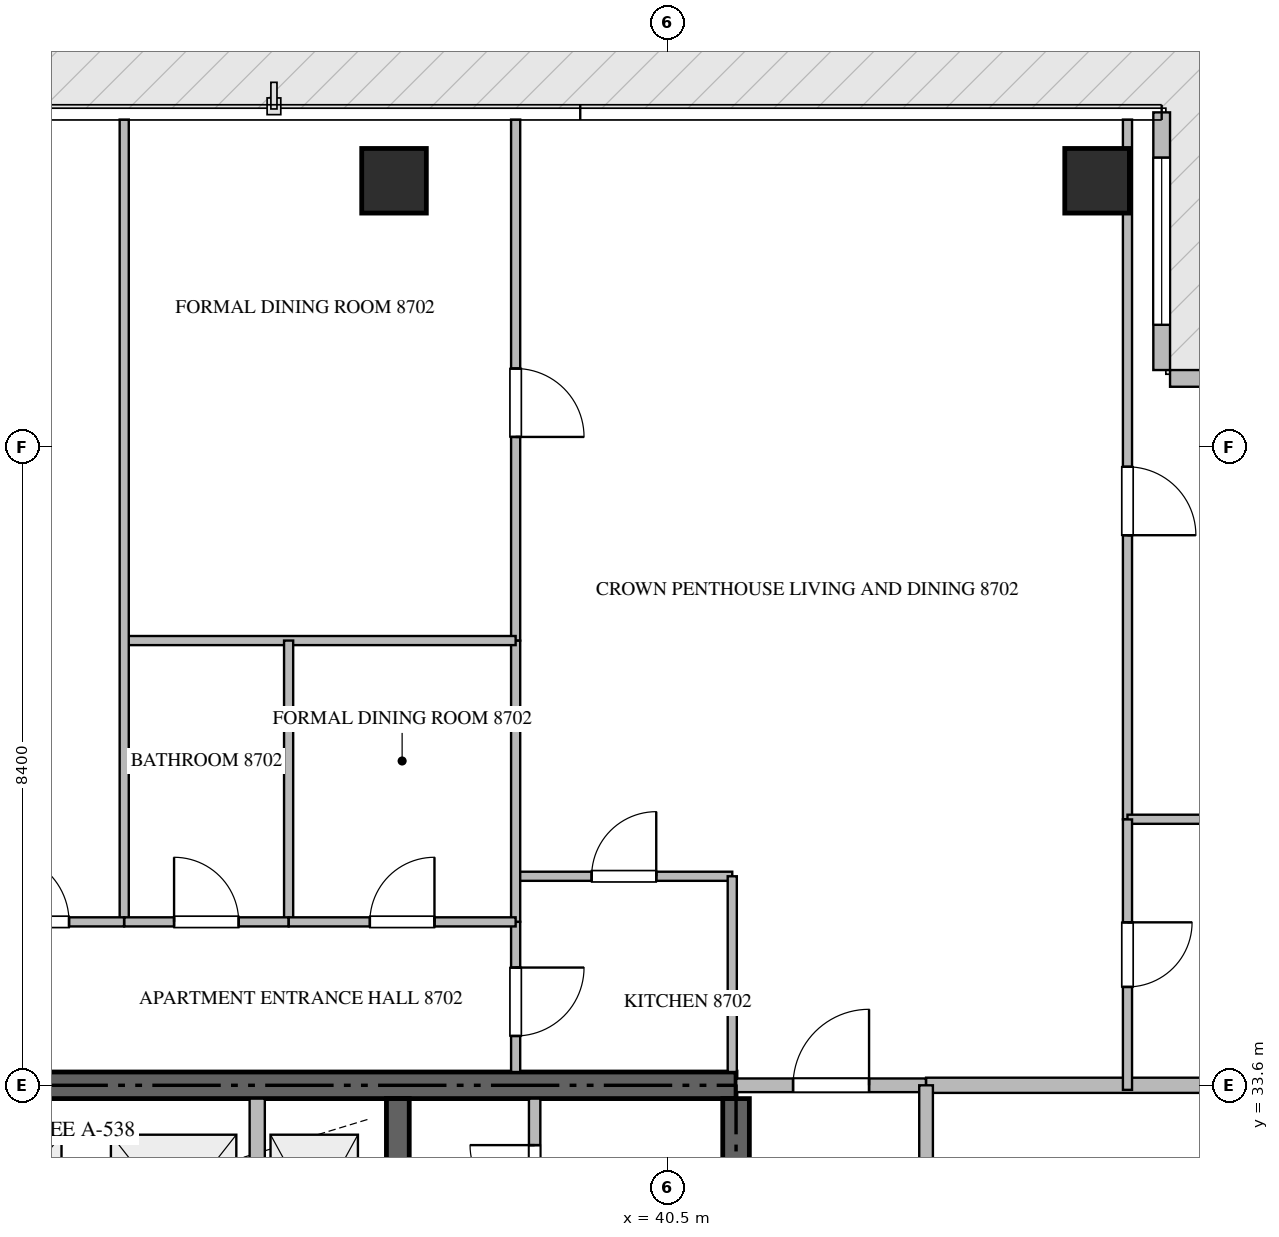
"""IFC4 building model, lengths in metres.
Left out: names, types, materials, properties, quantities, classifications, styles, units other than length and angle.
Written with IfcOpenShell. Run it as: python <this file> out.ifc"""

import sys

from ifc_helpers import new_model, si_unit, direction, frame, frame_2d, origin, origin_2d, place, context, subcontext, project, spatial, rectangle, extrude, source, transform, mapped, element, fill, save


model = new_model("IFC4")
c1 = context("Model", 3, precision=1e-05, world=origin(), true_north=direction((0.0, 1.0)))
c2 = subcontext(c1, "Body", "Model", "MODEL_VIEW")
j1 = project(units=[si_unit("LENGTHUNIT", "METRE"), si_unit("PLANEANGLEUNIT", "RADIAN")], contexts=[c1])
p1 = place(None, origin())
s1 = spatial("IfcSite", under=j1, at=p1, CompositionType="ELEMENT")
p2 = place(p1, origin())
s2 = spatial("IfcBuilding", under=s1, at=p2, CompositionType="ELEMENT")
p3 = place(p2, frame((0.0, 0.0, 353.85)))
s3 = spatial("IfcBuildingStorey", under=s2, at=p3, CompositionType="ELEMENT", Elevation=353.85)
p4 = place(p3, frame((41.4, 33.6, -0.26), z_axis=(0.0, 0.0, 1.0), x_axis=(-1.0, 0.0, 0.0)))
e1 = element("IfcWall", 1, at=p4, inside=s3, PredefinedType="SHEAR", context=c2, shape_type="SweptSolid", body=[
    extrude(rectangle(XDim=18.0, YDim=0.35, at=frame_2d((9.0, 0.0))), origin(), (0.0, 0.0, 1.0), 5.798),
])
p5 = place(p3, frame((41.4, 27.75, -0.26), z_axis=(0.0, 0.0, 1.0), x_axis=(0.0, 1.0, 0.0)))
e2 = element("IfcWall", 2, at=p5, inside=s3, PredefinedType="SHEAR", context=c2, shape_type="SweptSolid", body=[
    extrude(rectangle(XDim=5.675, YDim=0.35, at=frame_2d((2.837, 0.0))), origin(), (0.0, 0.0, 1.0), 5.798),
])
p6 = place(p3, frame((36.95, 27.05, -0.26), z_axis=(0.0, 0.0, 1.0), x_axis=(0.0, 1.0, 0.0)))
e3 = element("IfcWall", 3, at=p6, inside=s3, PredefinedType="SHEAR", context=c2, shape_type="SweptSolid", body=[
    extrude(rectangle(XDim=6.375, YDim=0.3, at=frame_2d((3.188, 0.0))), origin(), (0.0, 0.0, 1.0), 5.798),
])
m1 = source(origin(), c2, "Body", "SweptSolid", [
    extrude(rectangle(XDim=0.85, YDim=0.85, at=origin_2d()), origin(), (0.0, 0.0, 1.0), 5.8),
])
for number, where, z_axis, x_axis in (
    (4, (36.9, 45.5, -0.26), (0.0, 0.0, 1.0), (1.0, 0.0, 0.0)),
    (5, (46.15, 45.5, -0.26), (0.0, 0.0, 1.0), (1.0, 0.0, 0.0)),
):
    element("IfcColumn", number, at=place(p3, frame(where, z_axis=z_axis, x_axis=x_axis)), inside=s3, PredefinedType="COLUMN", context=c2, shape_type="MappedRepresentation", body=[
        mapped(m1, transform((0.0, 0.0, 0.0), scale=1.0)),
    ])
p7 = place(p3, frame((50.39, 42.9, 0.0), z_axis=(0.0, 0.0, 1.0), x_axis=(-1.0, 0.0, 0.0)))
e6 = element("IfcWall", 6, at=p7, inside=s3, PredefinedType="ELEMENTEDWALL", context=c2, shape_type="SweptSolid", body=[
    extrude(rectangle(XDim=3.28, YDim=0.22, at=frame_2d((1.64, 0.0))), origin(), (0.0, 0.0, 1.0), 5.525),
])
p8 = place(p7, frame((0.54, 0.0, 0.65)))
e7 = element("IfcOpeningElement", 7, at=p8, cuts=e6, PredefinedType="OPENING", context=c2, shape_type="SweptSolid", body=[
    extrude(rectangle(XDim=2.2, YDim=2.4, at=frame_2d((1.1, 1.2))), frame((0.0, 0.12, 0.0), z_axis=(0.0, -1.0, 0.0), x_axis=(1.0, 0.0, 0.0)), (0.0, 0.0, 1.0), 0.24),
])
p9 = place(p3, frame((47.0, 43.01, 0.0), z_axis=(0.0, 0.0, 1.0), x_axis=(0.0, 1.0, 0.0)))
e8 = element("IfcWall", 8, at=p9, inside=s3, PredefinedType="ELEMENTEDWALL", context=c2, shape_type="SweptSolid", body=[
    extrude(rectangle(XDim=3.39, YDim=0.22, at=frame_2d((1.695, 0.0))), origin(), (0.0, 0.0, 1.0), 5.525),
])
p10 = place(p9, frame((0.595, 0.0, 0.65)))
e9 = element("IfcOpeningElement", 9, at=p10, cuts=e8, PredefinedType="OPENING", context=c2, shape_type="SweptSolid", body=[
    extrude(rectangle(XDim=2.2, YDim=2.4, at=frame_2d((1.1, 1.2))), frame((0.0, 0.12, 0.0), z_axis=(0.0, -1.0, 0.0), x_axis=(1.0, 0.0, 0.0)), (0.0, 0.0, 1.0), 0.24),
])
p11 = place(p3, frame((35.1, 30.75, 0.0), z_axis=(0.0, 0.0, 1.0), x_axis=(0.0, 1.0, 0.0)))
e10 = element("IfcWall", 10, at=p11, inside=s3, PredefinedType="STANDARD", context=c2, shape_type="SweptSolid", body=[
    extrude(rectangle(XDim=2.675, YDim=0.2, at=frame_2d((1.337, 0.0))), origin(), (0.0, 0.0, 1.0), 5.54),
])
p12 = place(p3, frame((38.75, 31.352, 0.0), z_axis=(0.0, 0.0, 1.0), x_axis=(0.0, 1.0, 0.0)))
e11 = element("IfcWall", 11, at=p12, inside=s3, PredefinedType="PARTITIONING", context=c2, shape_type="SweptSolid", body=[
    extrude(rectangle(XDim=2.073, YDim=0.15, at=frame_2d((1.037, 0.0))), origin(), (0.0, 0.0, 1.0), 5.54),
])
p13 = place(p12, frame((0.611, 0.0, 0.0)))
e12 = element("IfcOpeningElement", 12, at=p13, cuts=e11, PredefinedType="OPENING", context=c2, shape_type="SweptSolid", body=[
    extrude(rectangle(XDim=0.85, YDim=2.1, at=frame_2d((0.425, 1.05))), frame((0.0, 0.085, 0.0), z_axis=(0.0, -1.0, 0.0), x_axis=(1.0, 0.0, 0.0)), (0.0, 0.0, 1.0), 0.17),
])
p14 = place(p3, frame((43.9, 33.6, 0.0), z_axis=(0.0, 0.0, 1.0), x_axis=(1.0, 0.0, 0.0)))
e13 = element("IfcWall", 13, at=p14, inside=s3, PredefinedType="PARTITIONING", context=c2, shape_type="SweptSolid", body=[
    extrude(rectangle(XDim=10.018, YDim=0.2, at=frame_2d((5.009, 0.0))), origin(), (0.0, 0.0, 1.0), 5.54),
])
p15 = place(p3, frame((41.402, 33.6, 0.0), z_axis=(0.0, 0.0, 1.0), x_axis=(1.0, 0.0, 0.0)))
e14 = element("IfcWall", 14, at=p15, inside=s3, PredefinedType="PARTITIONING", context=c2, shape_type="SweptSolid", body=[
    extrude(rectangle(XDim=2.496, YDim=0.18, at=frame_2d((1.248, 0.0))), origin(), (0.0, 0.0, 1.0), 5.54),
])
p16 = place(p15, frame((0.748, 0.0, 0.0)))
e15 = element("IfcOpeningElement", 15, at=p16, cuts=e14, PredefinedType="OPENING", context=c2, shape_type="SweptSolid", body=[
    extrude(rectangle(XDim=1.0, YDim=2.15, at=frame_2d((0.5, 1.075))), frame((0.0, 0.1, 0.0), z_axis=(0.0, -1.0, 0.0), x_axis=(1.0, 0.0, 0.0)), (0.0, 0.0, 1.0), 0.2),
])
p17 = place(p3, frame((43.9, 16.8, 0.0), z_axis=(0.0, 0.0, 1.0), x_axis=(0.0, 1.0, 0.0)))
e16 = element("IfcWall", 16, at=p17, inside=s3, PredefinedType="PARTITIONING", context=c2, shape_type="SweptSolid", body=[
    extrude(rectangle(XDim=16.8, YDim=0.18, at=frame_2d((8.4, 0.0))), origin(), (0.0, 0.0, 1.0), 5.54),
])
p18 = place(p17, frame((14.5, 0.0, 0.0)))
e17 = element("IfcOpeningElement", 17, at=p18, cuts=e16, PredefinedType="OPENING", context=c2, shape_type="SweptSolid", body=[
    extrude(rectangle(XDim=1.0, YDim=2.15, at=frame_2d((0.5, 1.075))), frame((0.0, 0.1, 0.0), z_axis=(0.0, -1.0, 0.0), x_axis=(1.0, 0.0, 0.0)), (0.0, 0.0, 1.0), 0.2),
])
p19 = place(p3, frame((38.5, 36.35, 0.0), z_axis=(0.0, 0.0, 1.0), x_axis=(1.0, 0.0, 0.0)))
e18 = element("IfcWall", 18, at=p19, inside=s3, PredefinedType="PARTITIONING", context=c2, shape_type="SweptSolid", body=[
    extrude(rectangle(XDim=2.85, YDim=0.12, at=frame_2d((1.425, 0.0))), origin(), (0.0, 0.0, 1.0), 5.54),
])
p20 = place(p19, frame((1.0, 0.0, 0.0)))
e19 = element("IfcOpeningElement", 19, at=p20, cuts=e18, PredefinedType="OPENING", context=c2, shape_type="SweptSolid", body=[
    extrude(rectangle(XDim=0.85, YDim=2.1, at=frame_2d((0.425, 1.05))), frame((0.0, 0.07, 0.0), z_axis=(0.0, -1.0, 0.0), x_axis=(1.0, 0.0, 0.0)), (0.0, 0.0, 1.0), 0.14),
])
p21 = place(p3, frame((41.35, 36.35, 0.0), z_axis=(0.0, 0.0, 1.0), x_axis=(0.0, -1.0, 0.0)))
e20 = element("IfcWall", 20, at=p21, inside=s3, PredefinedType="PARTITIONING", context=c2, shape_type="SweptSolid", body=[
    extrude(rectangle(XDim=2.575, YDim=0.12, at=frame_2d((1.288, 0.0))), origin(), (0.0, 0.0, 1.0), 5.54),
])
p22 = place(p3, frame((38.5, 35.75, 0.0), z_axis=(0.0, 0.0, 1.0), x_axis=(0.0, -1.0, 0.0)))
e21 = element("IfcWall", 21, at=p22, inside=s3, PredefinedType="PARTITIONING", context=c2, shape_type="SweptSolid", body=[
    extrude(rectangle(XDim=1.975, YDim=0.12, at=frame_2d((0.988, 0.0))), origin(), (0.0, 0.0, 1.0), 5.54),
])
p23 = place(p22, frame((0.601, 0.0, 0.0)))
e22 = element("IfcOpeningElement", 22, at=p23, cuts=e21, PredefinedType="OPENING", context=c2, shape_type="SweptSolid", body=[
    extrude(rectangle(XDim=0.9, YDim=2.1, at=frame_2d((0.45, 1.05))), frame((0.0, 0.07, 0.0), z_axis=(0.0, -1.0, 0.0), x_axis=(1.0, 0.0, 0.0)), (0.0, 0.0, 1.0), 0.14),
])
p24 = place(p3, frame((38.5, 46.305, 0.0), z_axis=(0.0, 0.0, 1.0), x_axis=(0.0, -1.0, 0.0)))
e23 = element("IfcWall", 23, at=p24, inside=s3, PredefinedType="PARTITIONING", context=c2, shape_type="SweptSolid", body=[
    extrude(rectangle(XDim=6.854, YDim=0.12, at=frame_2d((3.427, 0.0))), origin(), (0.0, 0.0, 1.0), 5.54),
])
p25 = place(p24, frame((3.275, 0.0, 0.0)))
e24 = element("IfcOpeningElement", 24, at=p25, cuts=e23, PredefinedType="OPENING", context=c2, shape_type="SweptSolid", body=[
    extrude(rectangle(XDim=0.9, YDim=2.1, at=frame_2d((0.45, 1.05))), frame((0.0, 0.07, 0.0), z_axis=(0.0, -1.0, 0.0), x_axis=(1.0, 0.0, 0.0)), (0.0, 0.0, 1.0), 0.14),
])
p26 = place(p3, frame((38.5, 39.449, 0.0), z_axis=(0.0, 0.0, 1.0), x_axis=(0.0, -1.0, 0.0)))
e25 = element("IfcWall", 25, at=p26, inside=s3, PredefinedType="PARTITIONING", context=c2, shape_type="SweptSolid", body=[
    extrude(rectangle(XDim=3.697, YDim=0.12, at=frame_2d((1.849, 0.0))), origin(), (0.0, 0.0, 1.0), 5.54),
])
p27 = place(p3, frame((33.35, 39.451, 0.0), z_axis=(0.0, 0.0, 1.0), x_axis=(1.0, 0.0, 0.0)))
e26 = element("IfcWall", 26, at=p27, inside=s3, PredefinedType="PARTITIONING", context=c2, shape_type="SweptSolid", body=[
    extrude(rectangle(XDim=5.15, YDim=0.12, at=frame_2d((2.575, 0.0))), origin(), (0.0, 0.0, 1.0), 5.54),
])
p28 = place(p3, frame((33.35, 46.305, 0.0), z_axis=(0.0, 0.0, 1.0), x_axis=(0.0, -1.0, 0.0)))
e27 = element("IfcWall", 27, at=p28, inside=s3, PredefinedType="PARTITIONING", context=c2, shape_type="SweptSolid", body=[
    extrude(rectangle(XDim=10.555, YDim=0.12, at=frame_2d((5.277, 0.0))), origin(), (0.0, 0.0, 1.0), 5.54),
])
p29 = place(p3, frame((35.513, 39.451, 0.0), z_axis=(0.0, 0.0, 1.0), x_axis=(0.0, -1.0, 0.0)))
e28 = element("IfcWall", 28, at=p29, inside=s3, PredefinedType="PARTITIONING", context=c2, shape_type="SweptSolid", body=[
    extrude(rectangle(XDim=3.701, YDim=0.12, at=frame_2d((1.851, 0.0))), origin(), (0.0, 0.0, 1.0), 5.54),
])
p30 = place(p3, frame((33.35, 35.75, 0.0), z_axis=(0.0, 0.0, 1.0), x_axis=(1.0, 0.0, 0.0)))
e29 = element("IfcWall", 29, at=p30, inside=s3, PredefinedType="PARTITIONING", context=c2, shape_type="SweptSolid", body=[
    extrude(rectangle(XDim=2.163, YDim=0.12, at=frame_2d((1.082, 0.0))), origin(), (0.0, 0.0, 1.0), 5.54),
])
p31 = place(p30, frame((0.656, 0.0, 0.0)))
e30 = element("IfcOpeningElement", 30, at=p31, cuts=e29, PredefinedType="OPENING", context=c2, shape_type="SweptSolid", body=[
    extrude(rectangle(XDim=0.85, YDim=2.1, at=frame_2d((0.425, 1.05))), frame((0.0, 0.07, 0.0), z_axis=(0.0, -1.0, 0.0), x_axis=(1.0, 0.0, 0.0)), (0.0, 0.0, 1.0), 0.14),
])
p32 = place(p3, frame((35.515, 35.75, 0.0), z_axis=(0.0, 0.0, 1.0), x_axis=(1.0, 0.0, 0.0)))
e31 = element("IfcWall", 31, at=p32, inside=s3, PredefinedType="PARTITIONING", context=c2, shape_type="SweptSolid", body=[
    extrude(rectangle(XDim=2.985, YDim=0.12, at=frame_2d((1.493, 0.0))), origin(), (0.0, 0.0, 1.0), 5.54),
])
p33 = place(p32, frame((1.067, 0.0, 0.0)))
e32 = element("IfcOpeningElement", 32, at=p33, cuts=e31, PredefinedType="OPENING", context=c2, shape_type="SweptSolid", body=[
    extrude(rectangle(XDim=0.85, YDim=2.1, at=frame_2d((0.425, 1.05))), frame((0.0, 0.07, 0.0), z_axis=(0.0, -1.0, 0.0), x_axis=(1.0, 0.0, 0.0)), (0.0, 0.0, 1.0), 0.14),
])
p34 = place(p3, frame((31.0, 35.75, 0.0), z_axis=(0.0, 0.0, 1.0), x_axis=(1.0, 0.0, 0.0)))
e33 = element("IfcWall", 33, at=p34, inside=s3, PredefinedType="PARTITIONING", context=c2, shape_type="SweptSolid", body=[
    extrude(rectangle(XDim=2.348, YDim=0.12, at=frame_2d((1.174, 0.0))), origin(), (0.0, 0.0, 1.0), 5.54),
])
p35 = place(p34, frame((0.724, 0.0, 0.0)))
e34 = element("IfcOpeningElement", 34, at=p35, cuts=e33, PredefinedType="OPENING", context=c2, shape_type="SweptSolid", body=[
    extrude(rectangle(XDim=0.9, YDim=2.1, at=frame_2d((0.45, 1.05))), frame((0.0, 0.07, 0.0), z_axis=(0.0, -1.0, 0.0), x_axis=(1.0, 0.0, 0.0)), (0.0, 0.0, 1.0), 0.14),
])
p36 = place(p3, frame((46.55, 46.305, 0.0), z_axis=(0.0, 0.0, 1.0), x_axis=(0.0, -1.0, 0.0)))
e35 = element("IfcWall", 35, at=p36, inside=s3, PredefinedType="PARTITIONING", context=c2, shape_type="SweptSolid", body=[
    extrude(rectangle(XDim=9.205, YDim=0.12, at=frame_2d((4.603, 0.0))), origin(), (0.0, 0.0, 1.0), 5.54),
])
p37 = place(p36, frame((4.568, 0.0, 0.0)))
e36 = element("IfcOpeningElement", 36, at=p37, cuts=e35, PredefinedType="OPENING", context=c2, shape_type="SweptSolid", body=[
    extrude(rectangle(XDim=0.9, YDim=2.1, at=frame_2d((0.45, 1.05))), frame((0.0, 0.07, 0.0), z_axis=(0.0, -1.0, 0.0), x_axis=(1.0, 0.0, 0.0)), (0.0, 0.0, 1.0), 0.14),
])
p38 = place(p3, frame((46.55, 37.1, 0.0), z_axis=(0.0, 0.0, 1.0), x_axis=(1.0, 0.0, 0.0)))
e37 = element("IfcWall", 37, at=p38, inside=s3, PredefinedType="PARTITIONING", context=c2, shape_type="SweptSolid", body=[
    extrude(rectangle(XDim=7.355, YDim=0.12, at=frame_2d((3.677, 0.0))), origin(), (0.0, 0.0, 1.0), 5.54),
])
p39 = place(p3, frame((46.55, 37.098, 0.0), z_axis=(0.0, 0.0, 1.0), x_axis=(0.0, -1.0, 0.0)))
e38 = element("IfcWall", 38, at=p39, inside=s3, PredefinedType="PARTITIONING", context=c2, shape_type="SweptSolid", body=[
    extrude(rectangle(XDim=3.558, YDim=0.12, at=frame_2d((1.779, 0.0))), origin(), (0.0, 0.0, 1.0), 5.54),
])
p40 = place(p39, frame((1.354, 0.0, 0.0)))
e39 = element("IfcOpeningElement", 39, at=p40, cuts=e38, PredefinedType="OPENING", context=c2, shape_type="SweptSolid", body=[
    extrude(rectangle(XDim=0.85, YDim=2.1, at=frame_2d((0.425, 1.05))), frame((0.0, 0.07, 0.0), z_axis=(0.0, -1.0, 0.0), x_axis=(1.0, 0.0, 0.0)), (0.0, 0.0, 1.0), 0.14),
])
m2 = source(origin(), c2, "Body", "SweptSolid", [
    extrude(rectangle(XDim=2.2, YDim=2.4, at=frame_2d((1.1, 1.2))), frame((0.0, 0.03, 0.0), z_axis=(0.0, -1.0, 0.0), x_axis=(1.0, 0.0, 0.0)), (0.0, 0.0, 1.0), 0.06),
])
p41 = place(p10, origin())
e40 = element("IfcWindow", 40, at=p41, inside=s3, PartitioningType="SINGLE_PANEL", PredefinedType="WINDOW", context=c2, shape_type="MappedRepresentation", body=[
    mapped(m2, transform((0.0, 0.0, 0.0), scale=1.0)),
])
fill(e9, e40)
m3 = source(origin(), c2, "Body", "SweptSolid", [
    extrude(rectangle(XDim=0.85, YDim=2.1, at=frame_2d((0.425, 1.05))), frame((0.0, 0.025, 0.0), z_axis=(0.0, -1.0, 0.0), x_axis=(1.0, 0.0, 0.0)), (0.0, 0.0, 1.0), 0.05),
])
p42 = place(p13, origin())
e41 = element("IfcDoor", 41, at=p42, inside=s3, OperationType="SINGLE_SWING_RIGHT", PredefinedType="DOOR", context=c2, shape_type="MappedRepresentation", body=[
    mapped(m3, transform((0.0, 0.0, 0.0), scale=1.0)),
])
fill(e12, e41)
m4 = source(origin(), c2, "Body", "SweptSolid", [
    extrude(rectangle(XDim=1.0, YDim=2.15, at=frame_2d((0.5, 1.075))), frame((0.0, 0.025, 0.0), z_axis=(0.0, -1.0, 0.0), x_axis=(1.0, 0.0, 0.0)), (0.0, 0.0, 1.0), 0.05),
])
p43 = place(p16, origin())
e42 = element("IfcDoor", 42, at=p43, inside=s3, OperationType="SINGLE_SWING_RIGHT", PredefinedType="DOOR", context=c2, shape_type="MappedRepresentation", body=[
    mapped(m4, transform((0.0, 0.0, 0.0), scale=1.0)),
])
fill(e15, e42)
p44 = place(p20, origin())
e43 = element("IfcDoor", 43, at=p44, inside=s3, OperationType="SINGLE_SWING_RIGHT", PredefinedType="DOOR", context=c2, shape_type="MappedRepresentation", body=[
    mapped(m3, transform((0.0, 0.0, 0.0), scale=1.0)),
])
fill(e19, e43)
m5 = source(origin(), c2, "Body", "SweptSolid", [
    extrude(rectangle(XDim=0.9, YDim=2.1, at=frame_2d((0.45, 1.05))), frame((0.0, 0.025, 0.0), z_axis=(0.0, -1.0, 0.0), x_axis=(1.0, 0.0, 0.0)), (0.0, 0.0, 1.0), 0.05),
])
p45 = place(p23, origin())
e44 = element("IfcDoor", 44, at=p45, inside=s3, OperationType="SINGLE_SWING_LEFT", PredefinedType="DOOR", context=c2, shape_type="MappedRepresentation", body=[
    mapped(m5, transform((0.0, 0.0, 0.0), scale=1.0)),
])
fill(e22, e44)
p46 = place(p25, origin())
e45 = element("IfcDoor", 45, at=p46, inside=s3, OperationType="SINGLE_SWING_RIGHT", PredefinedType="DOOR", context=c2, shape_type="MappedRepresentation", body=[
    mapped(m5, transform((0.0, 0.0, 0.0), scale=1.0)),
])
fill(e24, e45)
p47 = place(p31, origin())
e46 = element("IfcDoor", 46, at=p47, inside=s3, OperationType="SINGLE_SWING_LEFT", PredefinedType="DOOR", context=c2, shape_type="MappedRepresentation", body=[
    mapped(m3, transform((0.0, 0.0, 0.0), scale=1.0)),
])
fill(e30, e46)
p48 = place(p33, origin())
e47 = element("IfcDoor", 47, at=p48, inside=s3, OperationType="SINGLE_SWING_RIGHT", PredefinedType="DOOR", context=c2, shape_type="MappedRepresentation", body=[
    mapped(m3, transform((0.0, 0.0, 0.0), scale=1.0)),
])
fill(e32, e47)
p49 = place(p35, origin())
e48 = element("IfcDoor", 48, at=p49, inside=s3, OperationType="SINGLE_SWING_LEFT", PredefinedType="DOOR", context=c2, shape_type="MappedRepresentation", body=[
    mapped(m5, transform((0.0, 0.0, 0.0), scale=1.0)),
])
fill(e34, e48)
p50 = place(p37, origin())
e49 = element("IfcDoor", 49, at=p50, inside=s3, OperationType="SINGLE_SWING_RIGHT", PredefinedType="DOOR", context=c2, shape_type="MappedRepresentation", body=[
    mapped(m5, transform((0.0, 0.0, 0.0), scale=1.0)),
])
fill(e36, e49)
p51 = place(p40, origin())
e50 = element("IfcDoor", 50, at=p51, inside=s3, OperationType="SINGLE_SWING_LEFT", PredefinedType="DOOR", context=c2, shape_type="MappedRepresentation", body=[
    mapped(m3, transform((0.0, 0.0, 0.0), scale=1.0)),
])
fill(e39, e50)
save(model, sys.argv[1])
